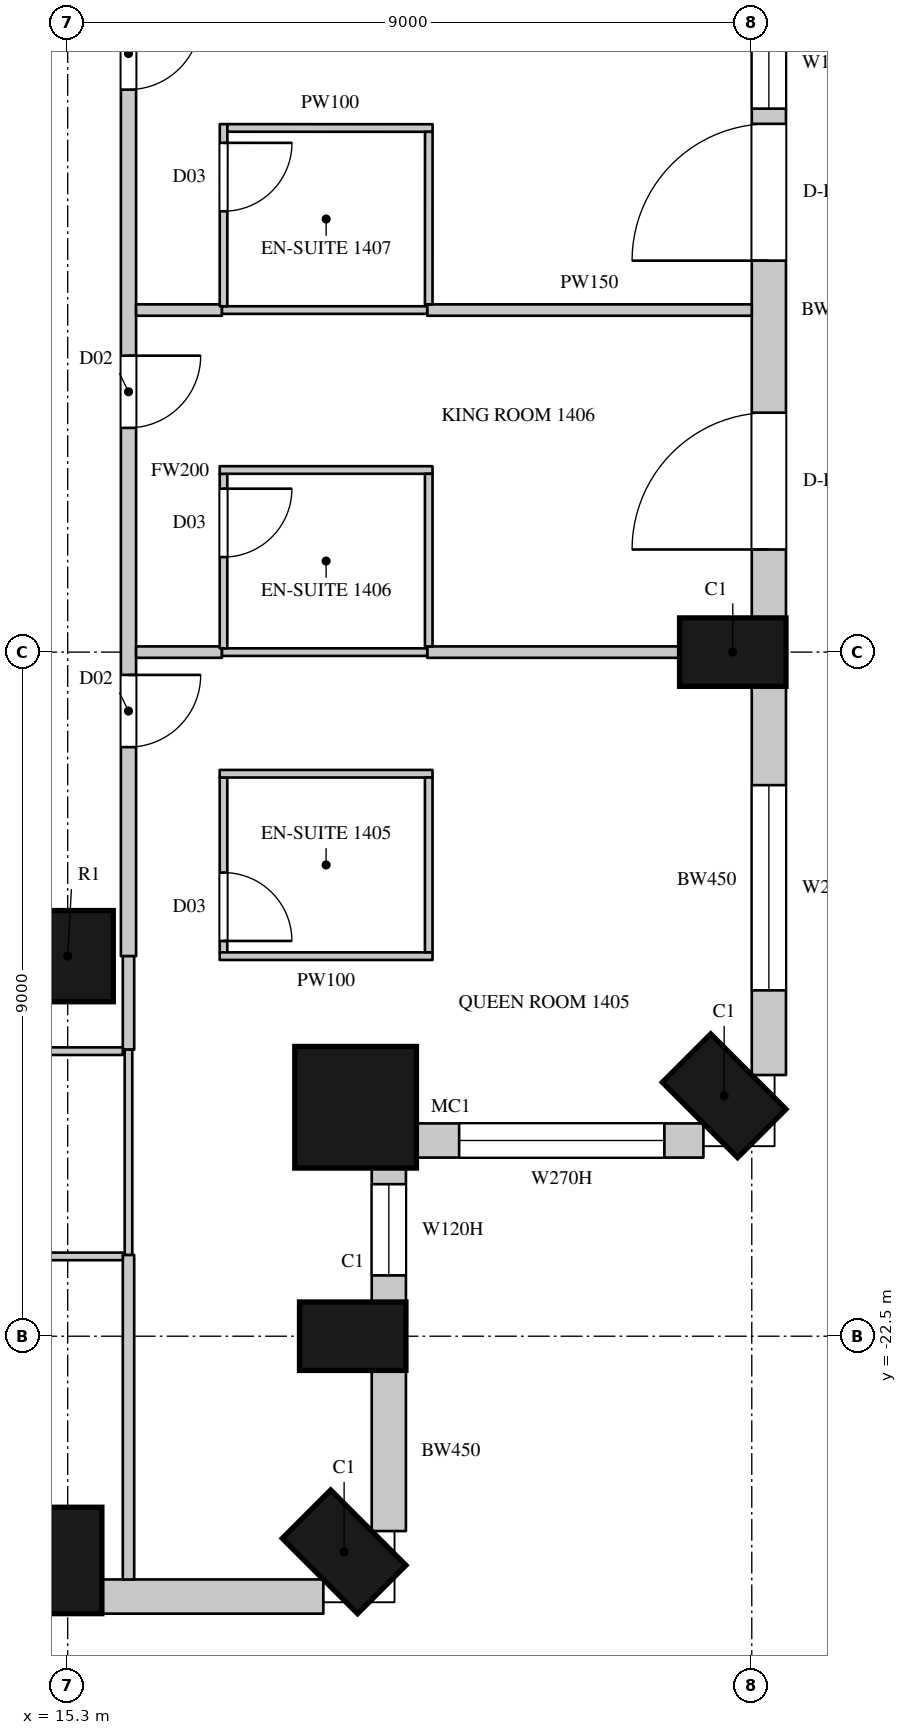
"""IFC4 building model, lengths in metres.
Left out: names, types, materials, properties, quantities, classifications, styles, units other than length and angle.
Written with IfcOpenShell. Run it as: python <this file> out.ifc"""

import sys

from ifc_helpers import new_model, si_unit, direction, frame, frame_2d, origin, origin_2d, place, context, subcontext, project, spatial, rectangle, circle, extrude, element, fill, save


model = new_model("IFC4")
c1 = context("Model", 3, precision=1e-05, world=origin(), true_north=direction((0.0, 1.0)))
c2 = subcontext(c1, "Body", "Model", "MODEL_VIEW")
j1 = project(units=[si_unit("LENGTHUNIT", "METRE"), si_unit("PLANEANGLEUNIT", "RADIAN")], contexts=[c1])
p1 = place(None, origin())
s1 = spatial("IfcSite", under=j1, at=p1, CompositionType="ELEMENT")
p2 = place(p1, origin())
s2 = spatial("IfcBuilding", under=s1, at=p2, CompositionType="ELEMENT")
p3 = place(p2, frame((0.0, 0.0, 80.7)))
s3 = spatial("IfcBuildingStorey", under=s2, at=p3, CompositionType="ELEMENT", Elevation=80.7)
for number, where, z_axis, x_axis in (
    (1, (15.3, -25.45, 0.0), (0.0, 0.0, 1.0), (1.0, 0.0, 0.0)),
    (2, (18.937, -25.337, 0.0), (0.0, 0.0, 1.0), (0.707, 0.707, 0.0)),
    (3, (19.05, -22.5, 0.0), (0.0, 0.0, 1.0), (0.0, 1.0, 0.0)),
):
    element("IfcColumn", number, at=place(p3, frame(where, z_axis=z_axis, x_axis=x_axis)), inside=s3, PredefinedType="COLUMN", context=c2, shape_type="SweptSolid", body=[
        extrude(rectangle(XDim=0.9, YDim=1.4, at=origin_2d()), origin(), (0.0, 0.0, 1.0), 3.6),
    ])
p4 = place(p3, frame((19.088, -19.488, 0.0), z_axis=(0.0, 0.0, 1.0), x_axis=(1.0, 0.0, 0.0)))
e4 = element("IfcColumn", 4, at=p4, inside=s3, PredefinedType="COLUMN", context=c2, shape_type="SweptSolid", body=[
    extrude(circle(Radius=0.8, at=origin_2d()), origin(), (0.0, 0.0, 1.0), 3.6),
])
for number, where, z_axis, x_axis in (
    (5, (23.937, -19.337, 0.0), (0.0, 0.0, 1.0), (0.707, 0.707, 0.0)),
    (6, (24.05, -13.5, 0.0), (0.0, 0.0, 1.0), (0.0, 1.0, 0.0)),
):
    element("IfcColumn", number, at=place(p3, frame(where, z_axis=z_axis, x_axis=x_axis)), inside=s3, PredefinedType="COLUMN", context=c2, shape_type="SweptSolid", body=[
        extrude(rectangle(XDim=0.9, YDim=1.4, at=origin_2d()), origin(), (0.0, 0.0, 1.0), 3.6),
    ])
p5 = place(p3, frame((15.3, -17.5, 0.0), z_axis=(0.0, 0.0, 1.0), x_axis=(1.0, 0.0, 0.0)))
e7 = element("IfcColumn", 7, at=p5, inside=s3, PredefinedType="COLUMN", context=c2, shape_type="SweptSolid", body=[
    extrude(circle(Radius=0.6, at=origin_2d()), origin(), (0.0, 0.0, 1.0), 3.6),
])
p6 = place(p3, frame((15.75, -25.925, 0.0), z_axis=(0.0, 0.0, 1.0), x_axis=(1.0, 0.0, 0.0)))
e8 = element("IfcWall", 8, at=p6, inside=s3, PredefinedType="SOLIDWALL", context=c2, shape_type="SweptSolid", body=[
    extrude(rectangle(XDim=2.914, YDim=0.45, at=frame_2d((1.457, 0.0))), origin(), (0.0, 0.0, 1.0), 3.3),
])
p7 = place(p3, frame((19.525, -25.064, 0.0), z_axis=(0.0, 0.0, 1.0), x_axis=(0.0, 1.0, 0.0)))
e9 = element("IfcWall", 9, at=p7, inside=s3, PredefinedType="SOLIDWALL", context=c2, shape_type="SweptSolid", body=[
    extrude(rectangle(XDim=2.114, YDim=0.45, at=frame_2d((1.057, 0.0))), origin(), (0.0, 0.0, 1.0), 3.3),
])
p8 = place(p3, frame((19.525, -22.05, 0.0), z_axis=(0.0, 0.0, 1.0), x_axis=(0.0, 1.0, 0.0)))
e10 = element("IfcWall", 10, at=p8, inside=s3, PredefinedType="SOLIDWALL", context=c2, shape_type="SweptSolid", body=[
    extrude(rectangle(XDim=1.792, YDim=0.45, at=frame_2d((0.896, 0.0))), origin(), (0.0, 0.0, 1.0), 3.3),
])
p9 = place(p8, frame((0.35, 0.0, 1.05)))
e11 = element("IfcOpeningElement", 11, at=p9, cuts=e10, PredefinedType="OPENING", context=c2, shape_type="SweptSolid", body=[
    extrude(rectangle(XDim=1.2, YDim=2.0, at=frame_2d((0.6, 1.0))), frame((0.0, 0.235, 0.0), z_axis=(0.0, -1.0, 0.0), x_axis=(1.0, 0.0, 0.0)), (0.0, 0.0, 1.0), 0.47),
])
p10 = place(p3, frame((19.858, -19.925, 0.0), z_axis=(0.0, 0.0, 1.0), x_axis=(1.0, 0.0, 0.0)))
e12 = element("IfcWall", 12, at=p10, inside=s3, PredefinedType="SOLIDWALL", context=c2, shape_type="SweptSolid", body=[
    extrude(rectangle(XDim=3.805, YDim=0.45, at=frame_2d((1.903, 0.0))), origin(), (0.0, 0.0, 1.0), 3.3),
])
p11 = place(p10, frame((0.592, 0.0, 1.05)))
e13 = element("IfcOpeningElement", 13, at=p11, cuts=e12, PredefinedType="OPENING", context=c2, shape_type="SweptSolid", body=[
    extrude(rectangle(XDim=2.7, YDim=2.0, at=frame_2d((1.35, 1.0))), frame((0.0, 0.235, 0.0), z_axis=(0.0, -1.0, 0.0), x_axis=(1.0, 0.0, 0.0)), (0.0, 0.0, 1.0), 0.47),
])
p12 = place(p3, frame((24.525, -19.064, 0.0), z_axis=(0.0, 0.0, 1.0), x_axis=(0.0, 1.0, 0.0)))
e14 = element("IfcWall", 14, at=p12, inside=s3, PredefinedType="SOLIDWALL", context=c2, shape_type="SweptSolid", body=[
    extrude(rectangle(XDim=5.114, YDim=0.45, at=frame_2d((2.557, 0.0))), origin(), (0.0, 0.0, 1.0), 3.3),
])
p13 = place(p12, frame((1.114, 0.0, 1.05)))
e15 = element("IfcOpeningElement", 15, at=p13, cuts=e14, PredefinedType="OPENING", context=c2, shape_type="SweptSolid", body=[
    extrude(rectangle(XDim=2.7, YDim=2.0, at=frame_2d((1.35, 1.0))), frame((0.0, 0.235, 0.0), z_axis=(0.0, -1.0, 0.0), x_axis=(1.0, 0.0, 0.0)), (0.0, 0.0, 1.0), 0.47),
])
p14 = place(p3, frame((24.525, -13.05, 0.0), z_axis=(0.0, 0.0, 1.0), x_axis=(0.0, 1.0, 0.0)))
e16 = element("IfcWall", 16, at=p14, inside=s3, PredefinedType="SOLIDWALL", context=c2, shape_type="SweptSolid", body=[
    extrude(rectangle(XDim=8.1, YDim=0.45, at=frame_2d((4.05, 0.0))), origin(), (0.0, 0.0, 1.0), 3.3),
])
p15 = place(p14, frame((0.9, 0.0, 0.0)))
e17 = element("IfcOpeningElement", 17, at=p15, cuts=e16, PredefinedType="OPENING", context=c2, shape_type="SweptSolid", body=[
    extrude(rectangle(XDim=1.8, YDim=2.4, at=frame_2d((0.9, 1.2))), frame((0.0, 0.235, 0.0), z_axis=(0.0, -1.0, 0.0), x_axis=(1.0, 0.0, 0.0)), (0.0, 0.0, 1.0), 0.47),
])
p16 = place(p14, frame((4.7, 0.0, 0.0)))
e18 = element("IfcOpeningElement", 18, at=p16, cuts=e16, PredefinedType="OPENING", context=c2, shape_type="SweptSolid", body=[
    extrude(rectangle(XDim=1.8, YDim=2.4, at=frame_2d((0.9, 1.2))), frame((0.0, 0.235, 0.0), z_axis=(0.0, -1.0, 0.0), x_axis=(1.0, 0.0, 0.0)), (0.0, 0.0, 1.0), 0.47),
])
p17 = place(p14, frame((6.7, 0.0, 1.05)))
e19 = element("IfcOpeningElement", 19, at=p17, cuts=e16, PredefinedType="OPENING", context=c2, shape_type="SweptSolid", body=[
    extrude(rectangle(XDim=1.2, YDim=2.0, at=frame_2d((0.6, 1.0))), frame((0.0, 0.235, 0.0), z_axis=(0.0, -1.0, 0.0), x_axis=(1.0, 0.0, 0.0)), (0.0, 0.0, 1.0), 0.47),
])
p18 = place(p3, frame((16.1, -17.5, 0.0), z_axis=(0.0, 0.0, 1.0), x_axis=(0.0, 1.0, 0.0)))
e20 = element("IfcWall", 20, at=p18, inside=s3, PredefinedType="PARTITIONING", context=c2, shape_type="SweptSolid", body=[
    extrude(rectangle(XDim=12.75, YDim=0.2, at=frame_2d((6.375, 0.0))), origin(), (0.0, 0.0, 1.0), 3.3),
])
p19 = place(p18, frame((2.75, 0.0, 0.0)))
e21 = element("IfcOpeningElement", 21, at=p19, cuts=e20, PredefinedType="OPENING", context=c2, shape_type="SweptSolid", body=[
    extrude(rectangle(XDim=0.95, YDim=2.2, at=frame_2d((0.475, 1.1))), frame((0.0, 0.11, 0.0), z_axis=(0.0, -1.0, 0.0), x_axis=(1.0, 0.0, 0.0)), (0.0, 0.0, 1.0), 0.22),
])
p20 = place(p18, frame((6.95, 0.0, 0.0)))
e22 = element("IfcOpeningElement", 22, at=p20, cuts=e20, PredefinedType="OPENING", context=c2, shape_type="SweptSolid", body=[
    extrude(rectangle(XDim=0.95, YDim=2.2, at=frame_2d((0.475, 1.1))), frame((0.0, 0.11, 0.0), z_axis=(0.0, -1.0, 0.0), x_axis=(1.0, 0.0, 0.0)), (0.0, 0.0, 1.0), 0.22),
])
p21 = place(p18, frame((11.4, 0.0, 0.0)))
e23 = element("IfcOpeningElement", 23, at=p21, cuts=e20, PredefinedType="OPENING", context=c2, shape_type="SweptSolid", body=[
    extrude(rectangle(XDim=0.95, YDim=2.2, at=frame_2d((0.475, 1.1))), frame((0.0, 0.11, 0.0), z_axis=(0.0, -1.0, 0.0), x_axis=(1.0, 0.0, 0.0)), (0.0, 0.0, 1.0), 0.22),
])
p22 = place(p3, frame((16.1, -25.7, 0.0), z_axis=(0.0, 0.0, 1.0), x_axis=(0.0, 1.0, 0.0)))
e24 = element("IfcWall", 24, at=p22, inside=s3, PredefinedType="PARTITIONING", context=c2, shape_type="SweptSolid", body=[
    extrude(rectangle(XDim=4.27, YDim=0.15, at=frame_2d((2.135, 0.0))), origin(), (0.0, 0.0, 1.0), 3.3),
])
p23 = place(p3, frame((16.1, -18.73, 0.0), z_axis=(0.0, 0.0, 1.0), x_axis=(0.0, 1.0, 0.0)))
e25 = element("IfcWall", 25, at=p23, inside=s3, PredefinedType="PARTITIONING", context=c2, shape_type="SweptSolid", body=[
    extrude(rectangle(XDim=1.23, YDim=0.15, at=frame_2d((0.615, 0.0))), origin(), (0.0, 0.0, 1.0), 3.3),
])
p24 = place(p3, frame((16.2, -13.5, 0.0), z_axis=(0.0, 0.0, 1.0), x_axis=(1.0, 0.0, 0.0)))
e26 = element("IfcWall", 26, at=p24, inside=s3, PredefinedType="PARTITIONING", context=c2, shape_type="SweptSolid", body=[
    extrude(rectangle(XDim=1.13, YDim=0.15, at=frame_2d((0.565, 0.0))), origin(), (0.0, 0.0, 1.0), 3.3),
])
p25 = place(p3, frame((16.2, -9.0, 0.0), z_axis=(0.0, 0.0, 1.0), x_axis=(1.0, 0.0, 0.0)))
e27 = element("IfcWall", 27, at=p25, inside=s3, PredefinedType="PARTITIONING", context=c2, shape_type="SweptSolid", body=[
    extrude(rectangle(XDim=1.13, YDim=0.15, at=frame_2d((0.565, 0.0))), origin(), (0.0, 0.0, 1.0), 2.65),
])
p26 = place(p3, frame((20.03, -13.5, 0.0), z_axis=(0.0, 0.0, 1.0), x_axis=(1.0, 0.0, 0.0)))
e28 = element("IfcWall", 28, at=p26, inside=s3, PredefinedType="PARTITIONING", context=c2, shape_type="SweptSolid", body=[
    extrude(rectangle(XDim=3.32, YDim=0.15, at=frame_2d((1.66, 0.0))), origin(), (0.0, 0.0, 1.0), 3.3),
])
p27 = place(p3, frame((20.03, -9.0, 0.0), z_axis=(0.0, 0.0, 1.0), x_axis=(1.0, 0.0, 0.0)))
e29 = element("IfcWall", 29, at=p27, inside=s3, PredefinedType="PARTITIONING", context=c2, shape_type="SweptSolid", body=[
    extrude(rectangle(XDim=4.27, YDim=0.15, at=frame_2d((2.135, 0.0))), origin(), (0.0, 0.0, 1.0), 2.65),
])
for number, where, z_axis, x_axis in (
    (30, (13.65, -21.45, 0.0), (0.0, 0.0, 1.0), (1.0, 0.0, 0.0)),
    (31, (13.65, -18.75, 0.0), (0.0, 0.0, 1.0), (1.0, 0.0, 0.0)),
):
    element("IfcWall", number, at=place(p3, frame(where, z_axis=z_axis, x_axis=x_axis)), inside=s3, PredefinedType="PARTITIONING", context=c2, shape_type="SweptSolid", body=[
        extrude(rectangle(XDim=2.375, YDim=0.1, at=frame_2d((1.188, 0.0))), origin(), (0.0, 0.0, 1.0), 3.3),
    ])
for number, where, z_axis, x_axis in (
    (32, (16.1, -21.43, 0.0), (0.0, 0.0, 1.0), (0.0, 1.0, 0.0)),
    (33, (17.33, -13.5, 0.0), (0.0, 0.0, 1.0), (1.0, 0.0, 0.0)),
):
    element("IfcWall", number, at=place(p3, frame(where, z_axis=z_axis, x_axis=x_axis)), inside=s3, PredefinedType="PARTITIONING", context=c2, shape_type="SweptSolid", body=[
        extrude(rectangle(XDim=2.7, YDim=0.1, at=frame_2d((1.35, 0.0))), origin(), (0.0, 0.0, 1.0), 3.3),
    ])
p28 = place(p3, frame((17.33, -9.0, 0.0), z_axis=(0.0, 0.0, 1.0), x_axis=(1.0, 0.0, 0.0)))
e34 = element("IfcWall", 34, at=p28, inside=s3, PredefinedType="PARTITIONING", context=c2, shape_type="SweptSolid", body=[
    extrude(rectangle(XDim=2.7, YDim=0.1, at=frame_2d((1.35, 0.0))), origin(), (0.0, 0.0, 1.0), 2.65),
])
p29 = place(p3, frame((17.35, -17.45, 0.0), z_axis=(0.0, 0.0, 1.0), x_axis=(0.0, 1.0, 0.0)))
e35 = element("IfcWall", 35, at=p29, inside=s3, PredefinedType="PARTITIONING", context=c2, shape_type="SweptSolid", body=[
    extrude(rectangle(XDim=2.3, YDim=0.1, at=frame_2d((1.15, 0.0))), origin(), (0.0, 0.0, 1.0), 3.3),
])
p30 = place(p29, frame((0.15, 0.0, 0.0)))
e36 = element("IfcOpeningElement", 36, at=p30, cuts=e35, PredefinedType="OPENING", context=c2, shape_type="SweptSolid", body=[
    extrude(rectangle(XDim=0.9, YDim=2.2, at=frame_2d((0.45, 1.1))), frame((0.0, 0.06, 0.0), z_axis=(0.0, -1.0, 0.0), x_axis=(1.0, 0.0, 0.0)), (0.0, 0.0, 1.0), 0.12),
])
for number, where, z_axis, x_axis in (
    (37, (17.3, -17.5, 0.0), (0.0, 0.0, 1.0), (1.0, 0.0, 0.0)),
    (38, (17.3, -15.1, 0.0), (0.0, 0.0, 1.0), (1.0, 0.0, 0.0)),
):
    element("IfcWall", number, at=place(p3, frame(where, z_axis=z_axis, x_axis=x_axis)), inside=s3, PredefinedType="PARTITIONING", context=c2, shape_type="SweptSolid", body=[
        extrude(rectangle(XDim=2.8, YDim=0.1, at=frame_2d((1.4, 0.0))), origin(), (0.0, 0.0, 1.0), 3.3),
    ])
p31 = place(p3, frame((17.35, -13.45, 0.0), z_axis=(0.0, 0.0, 1.0), x_axis=(0.0, 1.0, 0.0)))
e39 = element("IfcWall", 39, at=p31, inside=s3, PredefinedType="PARTITIONING", context=c2, shape_type="SweptSolid", body=[
    extrude(rectangle(XDim=2.296, YDim=0.1, at=frame_2d((1.148, 0.0))), origin(), (0.0, 0.0, 1.0), 3.3),
])
p32 = place(p31, frame((1.2, 0.0, 0.0)))
e40 = element("IfcOpeningElement", 40, at=p32, cuts=e39, PredefinedType="OPENING", context=c2, shape_type="SweptSolid", body=[
    extrude(rectangle(XDim=0.9, YDim=2.2, at=frame_2d((0.45, 1.1))), frame((0.0, 0.06, 0.0), z_axis=(0.0, -1.0, 0.0), x_axis=(1.0, 0.0, 0.0)), (0.0, 0.0, 1.0), 0.12),
])
p33 = place(p3, frame((17.3, -11.104, 0.0), z_axis=(0.0, 0.0, 1.0), x_axis=(1.0, 0.0, 0.0)))
e41 = element("IfcWall", 41, at=p33, inside=s3, PredefinedType="PARTITIONING", context=c2, shape_type="SweptSolid", body=[
    extrude(rectangle(XDim=2.8, YDim=0.1, at=frame_2d((1.4, 0.0))), origin(), (0.0, 0.0, 1.0), 3.3),
])
p34 = place(p3, frame((17.35, -8.95, 0.0), z_axis=(0.0, 0.0, 1.0), x_axis=(0.000407580973, 0.999999916939, 0.0)))
e42 = element("IfcWall", 42, at=p34, inside=s3, PredefinedType="PARTITIONING", context=c2, shape_type="SweptSolid", body=[
    extrude(rectangle(XDim=2.396, YDim=0.1, at=frame_2d((1.198, 0.0))), origin(), (0.0, 0.0, 1.0), 3.3),
])
p35 = place(p34, frame((1.25, 0.0, 0.0)))
e43 = element("IfcOpeningElement", 43, at=p35, cuts=e42, PredefinedType="OPENING", context=c2, shape_type="SweptSolid", body=[
    extrude(rectangle(XDim=0.9, YDim=2.2, at=frame_2d((0.45, 1.1))), frame((0.0, 0.06, 0.0), z_axis=(0.0, -1.0, 0.0), x_axis=(1.0, 0.0, 0.0)), (0.0, 0.0, 1.0), 0.12),
])
p36 = place(p3, frame((17.401, -6.604, 0.0), z_axis=(0.0, 0.0, 1.0), x_axis=(0.9999999346, -0.000361663629, 0.0)))
e44 = element("IfcWall", 44, at=p36, inside=s3, PredefinedType="PARTITIONING", context=c2, shape_type="SweptSolid", body=[
    extrude(rectangle(XDim=2.7, YDim=0.1, at=frame_2d((1.35, 0.0))), origin(), (0.0, 0.0, 1.0), 3.3),
])
p37 = place(p3, frame((20.05, -17.45, 0.0), z_axis=(0.0, 0.0, 1.0), x_axis=(0.0, 1.0, 0.0)))
e45 = element("IfcWall", 45, at=p37, inside=s3, PredefinedType="PARTITIONING", context=c2, shape_type="SweptSolid", body=[
    extrude(rectangle(XDim=2.3, YDim=0.1, at=frame_2d((1.15, 0.0))), origin(), (0.0, 0.0, 1.0), 3.3),
])
p38 = place(p3, frame((20.05, -13.425, 0.0), z_axis=(0.0, 0.0, 1.0), x_axis=(0.0, 1.0, 0.0)))
e46 = element("IfcWall", 46, at=p38, inside=s3, PredefinedType="PARTITIONING", context=c2, shape_type="SweptSolid", body=[
    extrude(rectangle(XDim=2.271, YDim=0.1, at=frame_2d((1.135, 0.0))), origin(), (0.0, 0.0, 1.0), 3.3),
])
p39 = place(p3, frame((20.05, -8.925, 0.0), z_axis=(0.0, 0.0, 1.0), x_axis=(0.000430200003, 0.999999907464, 0.0)))
e47 = element("IfcWall", 47, at=p39, inside=s3, PredefinedType="PARTITIONING", context=c2, shape_type="SweptSolid", body=[
    extrude(rectangle(XDim=2.27, YDim=0.1, at=frame_2d((1.135, 0.0))), origin(), (0.0, 0.0, 1.0), 3.3),
])
p40 = place(p9, origin())
e48 = element("IfcWindow", 48, at=p40, inside=s3, PartitioningType="SINGLE_PANEL", PredefinedType="WINDOW", context=c2, shape_type="SweptSolid", body=[
    extrude(rectangle(XDim=1.2, YDim=2.0, at=frame_2d((0.6, 1.0))), frame((0.0, 0.135, 0.0), z_axis=(0.0, -1.0, 0.0), x_axis=(1.0, 0.0, 0.0)), (0.0, 0.0, 1.0), 0.06),
])
fill(e11, e48)
p41 = place(p11, origin())
e49 = element("IfcWindow", 49, at=p41, inside=s3, PartitioningType="SINGLE_PANEL", PredefinedType="WINDOW", context=c2, shape_type="SweptSolid", body=[
    extrude(rectangle(XDim=2.7, YDim=2.0, at=frame_2d((1.35, 1.0))), frame((0.0, 0.135, 0.0), z_axis=(0.0, -1.0, 0.0), x_axis=(1.0, 0.0, 0.0)), (0.0, 0.0, 1.0), 0.06),
])
fill(e13, e49)
p42 = place(p13, origin())
e50 = element("IfcWindow", 50, at=p42, inside=s3, PartitioningType="SINGLE_PANEL", PredefinedType="WINDOW", context=c2, shape_type="SweptSolid", body=[
    extrude(rectangle(XDim=2.7, YDim=2.0, at=frame_2d((1.35, 1.0))), frame((0.0, 0.135, 0.0), z_axis=(0.0, -1.0, 0.0), x_axis=(1.0, 0.0, 0.0)), (0.0, 0.0, 1.0), 0.06),
])
fill(e15, e50)
p43 = place(p15, origin())
e51 = element("IfcDoor", 51, at=p43, inside=s3, OperationType="SLIDING_TO_LEFT", PredefinedType="DOOR", context=c2, shape_type="SweptSolid", body=[
    extrude(rectangle(XDim=1.8, YDim=2.4, at=frame_2d((0.9, 1.2))), frame((0.0, 0.13, 0.0), z_axis=(0.0, -1.0, 0.0), x_axis=(1.0, 0.0, 0.0)), (0.0, 0.0, 1.0), 0.05),
])
fill(e17, e51)
p44 = place(p16, origin())
e52 = element("IfcDoor", 52, at=p44, inside=s3, OperationType="SLIDING_TO_LEFT", PredefinedType="DOOR", context=c2, shape_type="SweptSolid", body=[
    extrude(rectangle(XDim=1.8, YDim=2.4, at=frame_2d((0.9, 1.2))), frame((0.0, 0.13, 0.0), z_axis=(0.0, -1.0, 0.0), x_axis=(1.0, 0.0, 0.0)), (0.0, 0.0, 1.0), 0.05),
])
fill(e18, e52)
p45 = place(p17, origin())
e53 = element("IfcWindow", 53, at=p45, inside=s3, PartitioningType="SINGLE_PANEL", PredefinedType="WINDOW", context=c2, shape_type="SweptSolid", body=[
    extrude(rectangle(XDim=1.2, YDim=2.0, at=frame_2d((0.6, 1.0))), frame((0.0, 0.135, 0.0), z_axis=(0.0, -1.0, 0.0), x_axis=(1.0, 0.0, 0.0)), (0.0, 0.0, 1.0), 0.06),
])
fill(e19, e53)
p46 = place(p19, origin())
e54 = element("IfcDoor", 54, at=p46, inside=s3, OperationType="SINGLE_SWING_LEFT", PredefinedType="DOOR", context=c2, shape_type="SweptSolid", body=[
    extrude(rectangle(XDim=0.95, YDim=2.2, at=frame_2d((0.475, 1.1))), frame((0.0, 0.025, 0.0), z_axis=(0.0, -1.0, 0.0), x_axis=(1.0, 0.0, 0.0)), (0.0, 0.0, 1.0), 0.05),
])
fill(e21, e54)
p47 = place(p30, origin())
e55 = element("IfcDoor", 55, at=p47, inside=s3, OperationType="SINGLE_SWING_RIGHT", PredefinedType="DOOR", context=c2, shape_type="SweptSolid", body=[
    extrude(rectangle(XDim=0.9, YDim=2.2, at=frame_2d((0.45, 1.1))), frame((0.0, 0.025, 0.0), z_axis=(0.0, -1.0, 0.0), x_axis=(1.0, 0.0, 0.0)), (0.0, 0.0, 1.0), 0.05),
])
fill(e36, e55)
p48 = place(p20, origin())
e56 = element("IfcDoor", 56, at=p48, inside=s3, OperationType="SINGLE_SWING_LEFT", PredefinedType="DOOR", context=c2, shape_type="SweptSolid", body=[
    extrude(rectangle(XDim=0.95, YDim=2.2, at=frame_2d((0.475, 1.1))), frame((0.0, 0.025, 0.0), z_axis=(0.0, -1.0, 0.0), x_axis=(1.0, 0.0, 0.0)), (0.0, 0.0, 1.0), 0.05),
])
fill(e22, e56)
p49 = place(p32, origin())
e57 = element("IfcDoor", 57, at=p49, inside=s3, OperationType="SINGLE_SWING_LEFT", PredefinedType="DOOR", context=c2, shape_type="SweptSolid", body=[
    extrude(rectangle(XDim=0.9, YDim=2.2, at=frame_2d((0.45, 1.1))), frame((0.0, 0.025, 0.0), z_axis=(0.0, -1.0, 0.0), x_axis=(1.0, 0.0, 0.0)), (0.0, 0.0, 1.0), 0.05),
])
fill(e40, e57)
p50 = place(p21, origin())
e58 = element("IfcDoor", 58, at=p50, inside=s3, OperationType="SINGLE_SWING_LEFT", PredefinedType="DOOR", context=c2, shape_type="SweptSolid", body=[
    extrude(rectangle(XDim=0.95, YDim=2.2, at=frame_2d((0.475, 1.1))), frame((0.0, 0.025, 0.0), z_axis=(0.0, -1.0, 0.0), x_axis=(1.0, 0.0, 0.0)), (0.0, 0.0, 1.0), 0.05),
])
fill(e23, e58)
p51 = place(p35, origin())
e59 = element("IfcDoor", 59, at=p51, inside=s3, OperationType="SINGLE_SWING_LEFT", PredefinedType="DOOR", context=c2, shape_type="SweptSolid", body=[
    extrude(rectangle(XDim=0.9, YDim=2.2, at=frame_2d((0.45, 1.1))), frame((0.0, 0.025, 0.0), z_axis=(0.0, -1.0, 0.0), x_axis=(1.0, 0.0, 0.0)), (0.0, 0.0, 1.0), 0.05),
])
fill(e43, e59)
save(model, sys.argv[1])
